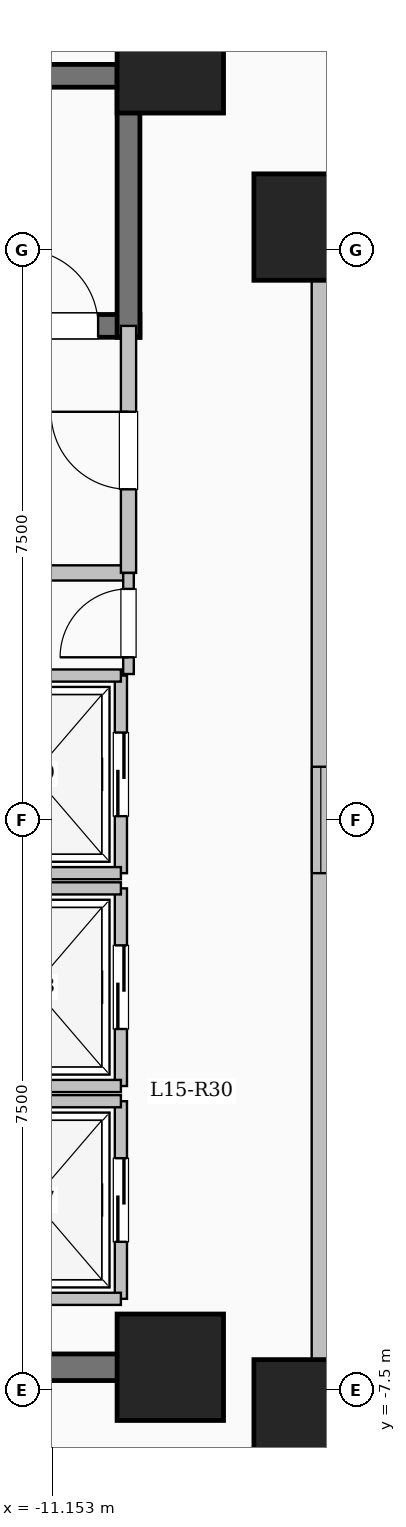
"""IFC4 building model, lengths in metres.
Left out: names, types, materials, properties, quantities, classifications, styles, units other than length and angle.
Written with IfcOpenShell. Run it as: python <this file> out.ifc"""

import sys

from ifc_helpers import new_model, si_unit, direction, frame, frame_2d, origin, origin_2d, place, context, subcontext, project, spatial, rectangle, extrude, element, fill, save


model = new_model("IFC4")
c1 = context("Model", 3, precision=1e-05, world=origin(), true_north=direction((0.0, 1.0)))
c2 = subcontext(c1, "Body", "Model", "MODEL_VIEW")
j1 = project(units=[si_unit("LENGTHUNIT", "METRE"), si_unit("PLANEANGLEUNIT", "RADIAN")], contexts=[c1])
p1 = place(None, origin())
s1 = spatial("IfcSite", under=j1, at=p1, CompositionType="ELEMENT")
p2 = place(p1, origin())
s2 = spatial("IfcBuilding", under=s1, at=p2, CompositionType="ELEMENT")
p3 = place(p2, frame((0.0, 0.0, 57.5)))
s3 = spatial("IfcBuildingStorey", under=s2, at=p3, CompositionType="ELEMENT", Elevation=57.5)
for number, where, z_axis, x_axis in (
    (1, (-7.8, -7.8, 0.0), (0.0, 0.0, 1.0), (1.0, 0.0, 0.0)),
    (2, (-7.8, 7.8, 0.0), (0.0, 0.0, 1.0), (1.0, 0.0, 0.0)),
    (3, (-9.6, -7.2, 0.0), (0.0, 0.0, 1.0), (1.0, 0.0, 0.0)),
    (4, (-9.6, 10.0, 0.0), (0.0, 0.0, 1.0), (1.0, 0.0, 0.0)),
):
    element("IfcColumn", number, at=place(p3, frame(where, z_axis=z_axis, x_axis=x_axis)), inside=s3, PredefinedType="COLUMN", context=c2, shape_type="SweptSolid", body=[
        extrude(rectangle(XDim=1.4, YDim=1.4, at=origin_2d()), origin(), (0.0, 0.0, 1.0), 3.35),
    ])
p4 = place(p3, frame((-7.62, -7.62, 0.0), z_axis=(0.0, 0.0, 1.0), x_axis=(1.0, 0.0, 0.0)))
e5 = element("IfcWall", 5, at=p4, inside=s3, PredefinedType="SOLIDWALL", context=c2, shape_type="SweptSolid", body=[
    extrude(rectangle(XDim=15.24, YDim=0.24, at=frame_2d((7.62, 0.0))), origin(), (0.0, 0.0, 1.0), 3.1),
])
p5 = place(p4, frame((6.92, 0.0, 0.95)))
e6 = element("IfcOpeningElement", 6, at=p5, cuts=e5, PredefinedType="OPENING", context=c2, shape_type="SweptSolid", body=[
    extrude(rectangle(XDim=1.4, YDim=1.5, at=frame_2d((0.7, 0.75))), frame((0.0, 0.13, 0.0), z_axis=(0.0, -1.0, 0.0), x_axis=(1.0, 0.0, 0.0)), (0.0, 0.0, 1.0), 0.26),
])
p6 = place(p3, frame((7.62, 7.62, 0.0), z_axis=(0.0, 0.0, 1.0), x_axis=(-1.0, 0.0, 0.0)))
e7 = element("IfcWall", 7, at=p6, inside=s3, PredefinedType="SOLIDWALL", context=c2, shape_type="SweptSolid", body=[
    extrude(rectangle(XDim=15.24, YDim=0.24, at=frame_2d((7.62, 0.0))), origin(), (0.0, 0.0, 1.0), 3.1),
])
p7 = place(p6, frame((6.92, 0.0, 0.95)))
e8 = element("IfcOpeningElement", 8, at=p7, cuts=e7, PredefinedType="OPENING", context=c2, shape_type="SweptSolid", body=[
    extrude(rectangle(XDim=1.4, YDim=1.5, at=frame_2d((0.7, 0.75))), frame((0.0, 0.13, 0.0), z_axis=(0.0, -1.0, 0.0), x_axis=(1.0, 0.0, 0.0)), (0.0, 0.0, 1.0), 0.26),
])
p8 = place(p3, frame((-7.62, 7.62, 0.0), z_axis=(0.0, 0.0, 1.0), x_axis=(0.0, -1.0, 0.0)))
e9 = element("IfcWall", 9, at=p8, inside=s3, PredefinedType="SOLIDWALL", context=c2, shape_type="SweptSolid", body=[
    extrude(rectangle(XDim=15.24, YDim=0.24, at=frame_2d((7.62, 0.0))), origin(), (0.0, 0.0, 1.0), 3.1),
])
p9 = place(p8, frame((6.92, 0.0, 0.95)))
e10 = element("IfcOpeningElement", 10, at=p9, cuts=e9, PredefinedType="OPENING", context=c2, shape_type="SweptSolid", body=[
    extrude(rectangle(XDim=1.4, YDim=1.5, at=frame_2d((0.7, 0.75))), frame((0.0, 0.13, 0.0), z_axis=(0.0, -1.0, 0.0), x_axis=(1.0, 0.0, 0.0)), (0.0, 0.0, 1.0), 0.26),
])
p10 = place(p3, frame((-18.0, 9.79, 0.0), z_axis=(0.0, 0.0, 1.0), x_axis=(1.0, 0.0, 0.0)))
e11 = element("IfcWall", 11, at=p10, inside=s3, PredefinedType="SHEAR", context=c2, shape_type="SweptSolid", body=[
    extrude(rectangle(XDim=8.0, YDim=0.3, at=frame_2d((4.0, 0.0))), origin(), (0.0, 0.0, 1.0), 3.35),
])
p11 = place(p3, frame((-18.0, 6.5, 0.0), z_axis=(0.0, 0.0, 1.0), x_axis=(1.0, 0.0, 0.0)))
e12 = element("IfcWall", 12, at=p11, inside=s3, PredefinedType="SHEAR", context=c2, shape_type="SweptSolid", body=[
    extrude(rectangle(XDim=8.0, YDim=0.3, at=frame_2d((4.0, 0.0))), origin(), (0.0, 0.0, 1.0), 3.35),
])
p12 = place(p11, frame((6.45, 0.0, 0.0)))
e13 = element("IfcOpeningElement", 13, at=p12, cuts=e12, PredefinedType="OPENING", context=c2, shape_type="SweptSolid", body=[
    extrude(rectangle(XDim=1.0, YDim=2.15, at=frame_2d((0.5, 1.075))), frame((0.0, 0.16, 0.0), z_axis=(0.0, -1.0, 0.0), x_axis=(1.0, 0.0, 0.0)), (0.0, 0.0, 1.0), 0.32),
])
p13 = place(p3, frame((-10.15, 6.35, 0.0), z_axis=(0.0, 0.0, 1.0), x_axis=(0.0, 1.0, 0.0)))
e14 = element("IfcWall", 14, at=p13, inside=s3, PredefinedType="SHEAR", context=c2, shape_type="SweptSolid", body=[
    extrude(rectangle(XDim=3.59, YDim=0.3, at=frame_2d((1.795, 0.0))), origin(), (0.0, 0.0, 1.0), 3.35),
])
p14 = place(p3, frame((-15.55, 3.25, 0.0), z_axis=(0.0, 0.0, 1.0), x_axis=(1.0, 0.0, 0.0)))
e15 = element("IfcWall", 15, at=p14, inside=s3, PredefinedType="SOLIDWALL", context=c2, shape_type="SweptSolid", body=[
    extrude(rectangle(XDim=5.4, YDim=0.2, at=frame_2d((2.7, 0.0))), origin(), (0.0, 0.0, 1.0), 3.1),
])
p15 = place(p3, frame((-10.15, 3.25, 0.0), z_axis=(0.0, 0.0, 1.0), x_axis=(0.0, 1.0, 0.0)))
e16 = element("IfcWall", 16, at=p15, inside=s3, PredefinedType="SOLIDWALL", context=c2, shape_type="SweptSolid", body=[
    extrude(rectangle(XDim=3.25, YDim=0.2, at=frame_2d((1.625, 0.0))), origin(), (0.0, 0.0, 1.0), 3.1),
])
p16 = place(p15, frame((1.1, 0.0, 0.0)))
e17 = element("IfcOpeningElement", 17, at=p16, cuts=e16, PredefinedType="OPENING", context=c2, shape_type="SweptSolid", body=[
    extrude(rectangle(XDim=1.02, YDim=2.15, at=frame_2d((0.51, 1.075))), frame((0.0, 0.11, 0.0), z_axis=(0.0, -1.0, 0.0), x_axis=(1.0, 0.0, 0.0)), (0.0, 0.0, 1.0), 0.22),
])
p17 = place(p3, frame((-10.25, -6.3, 0.0), z_axis=(0.0, 0.0, 1.0), x_axis=(0.0, 1.0, 0.0)))
e18 = element("IfcWall", 18, at=p17, inside=s3, PredefinedType="SOLIDWALL", context=c2, shape_type="SweptSolid", body=[
    extrude(rectangle(XDim=2.6, YDim=0.16, at=frame_2d((1.3, 0.0))), origin(), (0.0, 0.0, 1.0), 3.1),
])
p18 = place(p17, frame((0.75, 0.0, 0.0)))
e19 = element("IfcOpeningElement", 19, at=p18, cuts=e18, PredefinedType="OPENING", context=c2, shape_type="SweptSolid", body=[
    extrude(rectangle(XDim=1.1, YDim=2.15, at=frame_2d((0.55, 1.075))), frame((0.0, 0.09, 0.0), z_axis=(0.0, -1.0, 0.0), x_axis=(1.0, 0.0, 0.0)), (0.0, 0.0, 1.0), 0.18),
])
for number, where, z_axis, x_axis in (
    (20, (-12.55, -6.3, 0.0), (0.0, 0.0, 1.0), (1.0, 0.0, 0.0)),
    (21, (-12.55, -3.7, 0.0), (0.0, 0.0, 1.0), (1.0, 0.0, 0.0)),
):
    element("IfcWall", number, at=place(p3, frame(where, z_axis=z_axis, x_axis=x_axis)), inside=s3, PredefinedType="SOLIDWALL", context=c2, shape_type="SweptSolid", body=[
        extrude(rectangle(XDim=2.3, YDim=0.16, at=frame_2d((1.15, 0.0))), origin(), (0.0, 0.0, 1.0), 3.1),
    ])
p19 = place(p3, frame((-10.25, -3.5, 0.0), z_axis=(0.0, 0.0, 1.0), x_axis=(0.0, 1.0, 0.0)))
e22 = element("IfcWall", 22, at=p19, inside=s3, PredefinedType="SOLIDWALL", context=c2, shape_type="SweptSolid", body=[
    extrude(rectangle(XDim=2.6, YDim=0.16, at=frame_2d((1.3, 0.0))), origin(), (0.0, 0.0, 1.0), 3.1),
])
p20 = place(p19, frame((0.75, 0.0, 0.0)))
e23 = element("IfcOpeningElement", 23, at=p20, cuts=e22, PredefinedType="OPENING", context=c2, shape_type="SweptSolid", body=[
    extrude(rectangle(XDim=1.1, YDim=2.15, at=frame_2d((0.55, 1.075))), frame((0.0, 0.09, 0.0), z_axis=(0.0, -1.0, 0.0), x_axis=(1.0, 0.0, 0.0)), (0.0, 0.0, 1.0), 0.18),
])
for number, where, z_axis, x_axis in (
    (24, (-12.55, -3.5, 0.0), (0.0, 0.0, 1.0), (1.0, 0.0, 0.0)),
    (25, (-12.55, -0.9, 0.0), (0.0, 0.0, 1.0), (1.0, 0.0, 0.0)),
):
    element("IfcWall", number, at=place(p3, frame(where, z_axis=z_axis, x_axis=x_axis)), inside=s3, PredefinedType="SOLIDWALL", context=c2, shape_type="SweptSolid", body=[
        extrude(rectangle(XDim=2.3, YDim=0.16, at=frame_2d((1.15, 0.0))), origin(), (0.0, 0.0, 1.0), 3.1),
    ])
p21 = place(p3, frame((-10.25, -0.7, 0.0), z_axis=(0.0, 0.0, 1.0), x_axis=(0.0, 1.0, 0.0)))
e26 = element("IfcWall", 26, at=p21, inside=s3, PredefinedType="SOLIDWALL", context=c2, shape_type="SweptSolid", body=[
    extrude(rectangle(XDim=2.6, YDim=0.16, at=frame_2d((1.3, 0.0))), origin(), (0.0, 0.0, 1.0), 3.1),
])
p22 = place(p21, frame((0.75, 0.0, 0.0)))
e27 = element("IfcOpeningElement", 27, at=p22, cuts=e26, PredefinedType="OPENING", context=c2, shape_type="SweptSolid", body=[
    extrude(rectangle(XDim=1.1, YDim=2.15, at=frame_2d((0.55, 1.075))), frame((0.0, 0.09, 0.0), z_axis=(0.0, -1.0, 0.0), x_axis=(1.0, 0.0, 0.0)), (0.0, 0.0, 1.0), 0.18),
])
for number, where, z_axis, x_axis in (
    (28, (-12.55, -0.7, 0.0), (0.0, 0.0, 1.0), (1.0, 0.0, 0.0)),
    (29, (-12.55, 1.9, 0.0), (0.0, 0.0, 1.0), (1.0, 0.0, 0.0)),
):
    element("IfcWall", number, at=place(p3, frame(where, z_axis=z_axis, x_axis=x_axis)), inside=s3, PredefinedType="SOLIDWALL", context=c2, shape_type="SweptSolid", body=[
        extrude(rectangle(XDim=2.3, YDim=0.16, at=frame_2d((1.15, 0.0))), origin(), (0.0, 0.0, 1.0), 3.1),
    ])
p23 = place(p3, frame((-18.625, -7.2, 0.0), z_axis=(0.0, 0.0, 1.0), x_axis=(1.0, 0.0, 0.0)))
e30 = element("IfcWall", 30, at=p23, inside=s3, PredefinedType="SHEAR", context=c2, shape_type="SweptSolid", body=[
    extrude(rectangle(XDim=8.55, YDim=0.35, at=frame_2d((4.275, 0.0))), origin(), (0.0, 0.0, 1.0), 3.35),
])
p24 = place(p3, frame((-10.15, 1.92, 0.0), z_axis=(0.0, 0.0, 1.0), x_axis=(0.0, 1.0, 0.0)))
e31 = element("IfcWall", 31, at=p24, inside=s3, PredefinedType="PARTITIONING", context=c2, shape_type="SweptSolid", body=[
    extrude(rectangle(XDim=1.33, YDim=0.14, at=frame_2d((0.665, 0.0))), origin(), (0.0, 0.0, 1.0), 3.1),
])
p25 = place(p24, frame((0.22, 0.0, 0.0)))
e32 = element("IfcOpeningElement", 32, at=p25, cuts=e31, PredefinedType="OPENING", context=c2, shape_type="SweptSolid", body=[
    extrude(rectangle(XDim=0.9, YDim=2.08, at=frame_2d((0.45, 1.04))), frame((0.0, 0.08, 0.0), z_axis=(0.0, -1.0, 0.0), x_axis=(1.0, 0.0, 0.0)), (0.0, 0.0, 1.0), 0.16),
])
p26 = place(p9, origin())
e33 = element("IfcWindow", 33, at=p26, inside=s3, PartitioningType="SINGLE_PANEL", PredefinedType="WINDOW", context=c2, shape_type="SweptSolid", body=[
    extrude(rectangle(XDim=1.4, YDim=1.5, at=frame_2d((0.7, 0.75))), frame((0.0, 0.03, 0.0), z_axis=(0.0, -1.0, 0.0), x_axis=(1.0, 0.0, 0.0)), (0.0, 0.0, 1.0), 0.06),
])
fill(e10, e33)
p27 = place(p12, origin())
e34 = element("IfcDoor", 34, at=p27, inside=s3, OperationType="SINGLE_SWING_LEFT", PredefinedType="DOOR", context=c2, shape_type="SweptSolid", body=[
    extrude(rectangle(XDim=1.0, YDim=2.15, at=frame_2d((0.5, 1.075))), frame((0.0, 0.025, 0.0), z_axis=(0.0, -1.0, 0.0), x_axis=(1.0, 0.0, 0.0)), (0.0, 0.0, 1.0), 0.05),
])
fill(e13, e34)
p28 = place(p16, origin())
e35 = element("IfcDoor", 35, at=p28, inside=s3, OperationType="SINGLE_SWING_RIGHT", PredefinedType="DOOR", context=c2, shape_type="SweptSolid", body=[
    extrude(rectangle(XDim=1.02, YDim=2.15, at=frame_2d((0.51, 1.075))), frame((0.0, 0.025, 0.0), z_axis=(0.0, -1.0, 0.0), x_axis=(1.0, 0.0, 0.0)), (0.0, 0.0, 1.0), 0.05),
])
fill(e17, e35)
p29 = place(p18, origin())
e36 = element("IfcDoor", 36, at=p29, inside=s3, OperationType="SLIDING_TO_LEFT", PredefinedType="DOOR", context=c2, shape_type="SweptSolid", body=[
    extrude(rectangle(XDim=1.1, YDim=2.15, at=frame_2d((0.55, 1.075))), frame((0.0, 0.025, 0.0), z_axis=(0.0, -1.0, 0.0), x_axis=(1.0, 0.0, 0.0)), (0.0, 0.0, 1.0), 0.05),
])
fill(e19, e36)
p30 = place(p20, origin())
e37 = element("IfcDoor", 37, at=p30, inside=s3, OperationType="SLIDING_TO_LEFT", PredefinedType="DOOR", context=c2, shape_type="SweptSolid", body=[
    extrude(rectangle(XDim=1.1, YDim=2.15, at=frame_2d((0.55, 1.075))), frame((0.0, 0.025, 0.0), z_axis=(0.0, -1.0, 0.0), x_axis=(1.0, 0.0, 0.0)), (0.0, 0.0, 1.0), 0.05),
])
fill(e23, e37)
p31 = place(p22, origin())
e38 = element("IfcDoor", 38, at=p31, inside=s3, OperationType="SLIDING_TO_LEFT", PredefinedType="DOOR", context=c2, shape_type="SweptSolid", body=[
    extrude(rectangle(XDim=1.1, YDim=2.15, at=frame_2d((0.55, 1.075))), frame((0.0, 0.025, 0.0), z_axis=(0.0, -1.0, 0.0), x_axis=(1.0, 0.0, 0.0)), (0.0, 0.0, 1.0), 0.05),
])
fill(e27, e38)
p32 = place(p25, origin())
e39 = element("IfcDoor", 39, at=p32, inside=s3, OperationType="SINGLE_SWING_LEFT", PredefinedType="DOOR", context=c2, shape_type="SweptSolid", body=[
    extrude(rectangle(XDim=0.9, YDim=2.08, at=frame_2d((0.45, 1.04))), frame((0.0, 0.025, 0.0), z_axis=(0.0, -1.0, 0.0), x_axis=(1.0, 0.0, 0.0)), (0.0, 0.0, 1.0), 0.05),
])
fill(e32, e39)
save(model, sys.argv[1])
